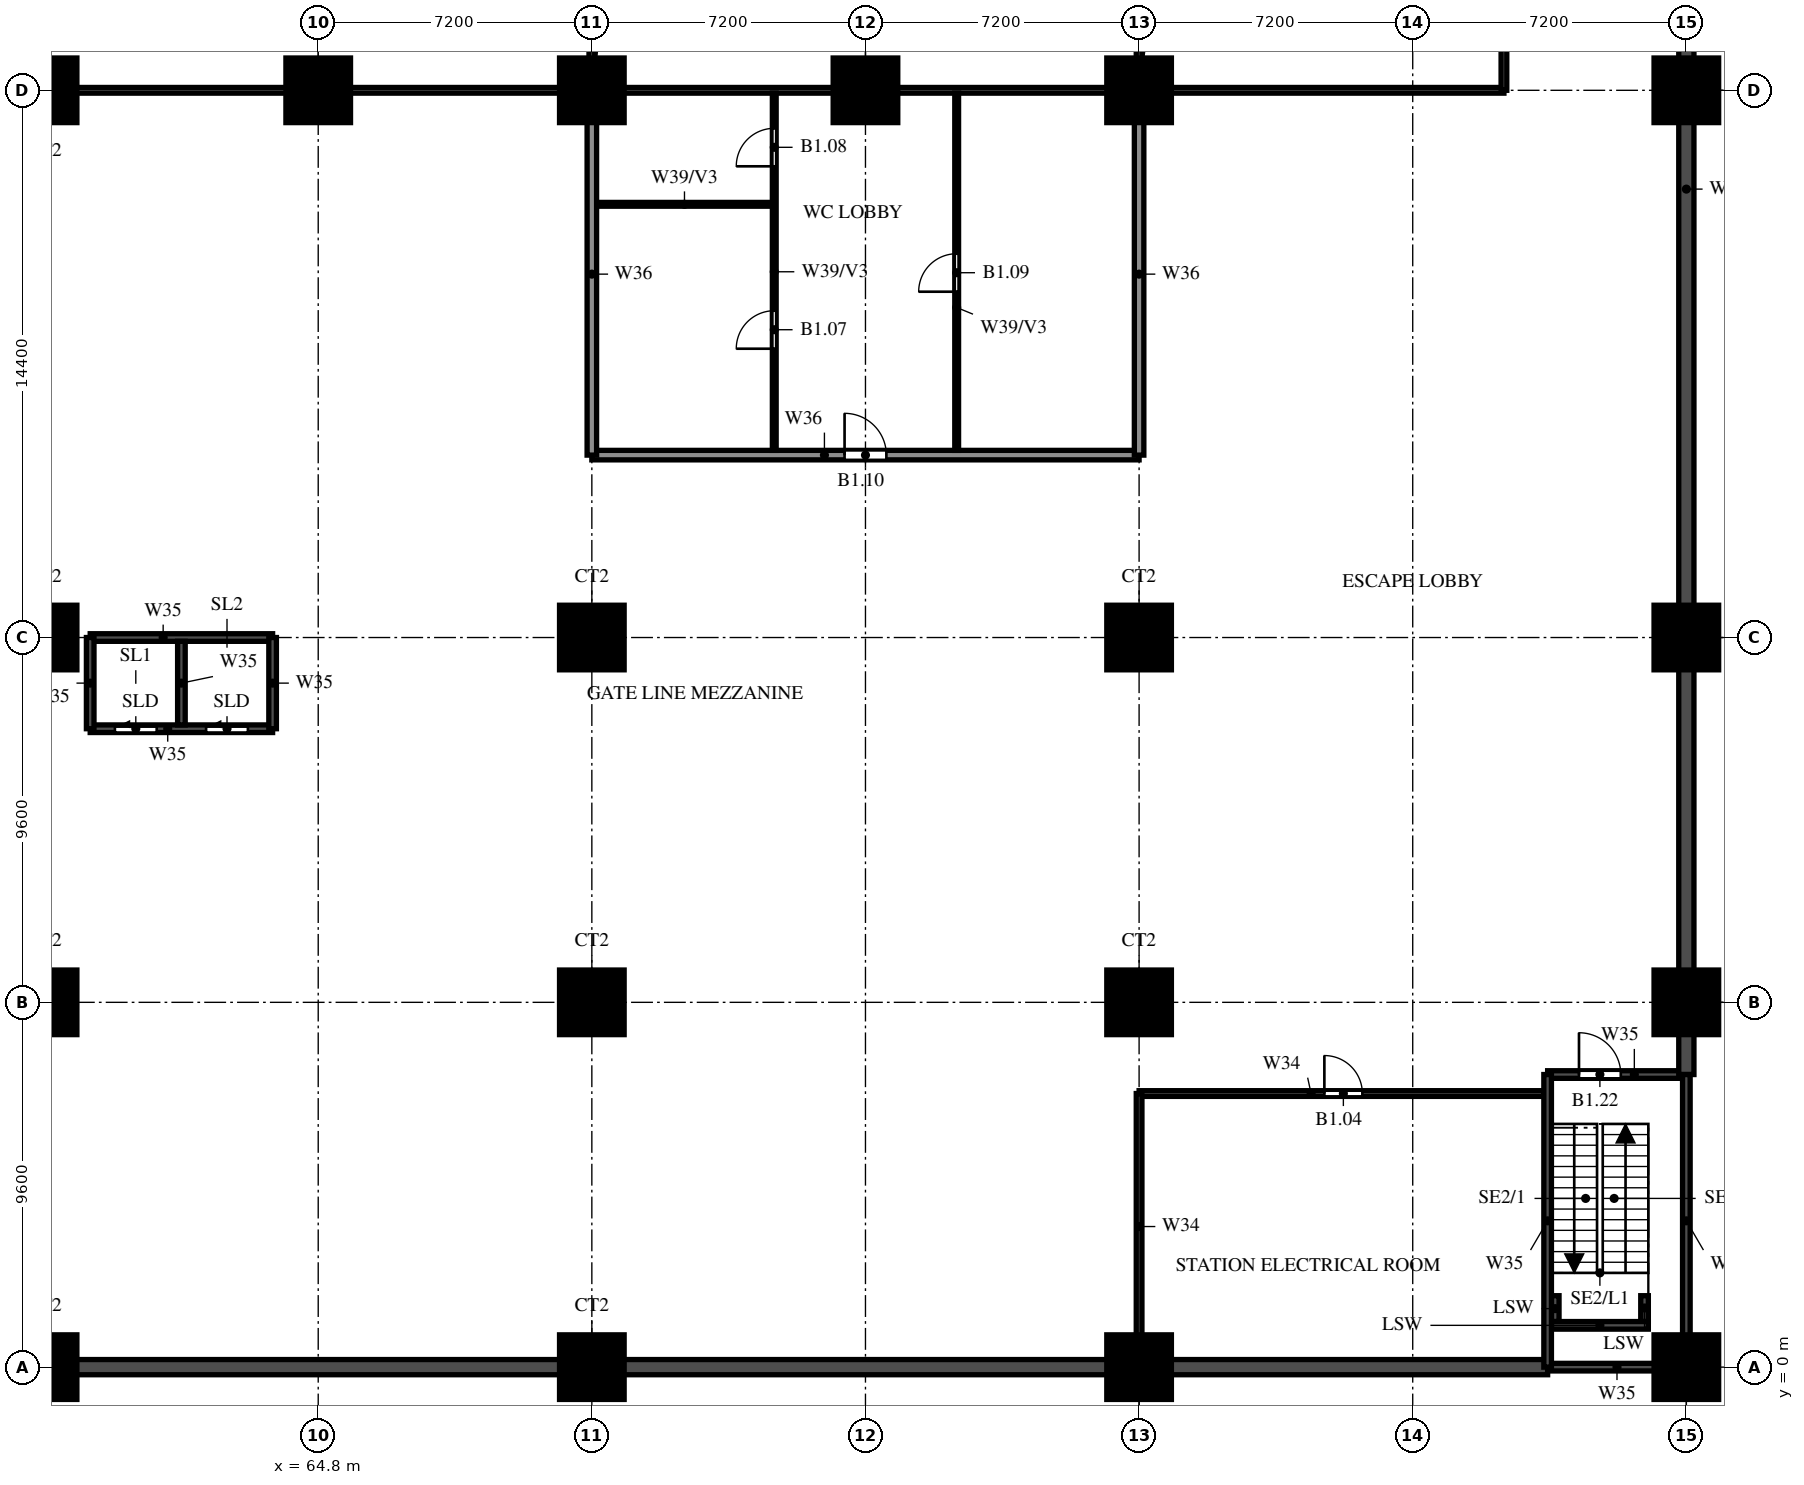
"""IFC4 building model, lengths in metres.
Left out: names, types, materials, properties, quantities, classifications, styles, units other than length and angle.
Written with IfcOpenShell. Run it as: python <this file> out.ifc"""

import sys

from ifc_helpers import new_model, si_unit, direction, frame, frame_2d, origin, origin_2d, place, context, subcontext, project, spatial, rectangle, extrude, source, transform, mapped, element, fill, save


model = new_model("IFC4")
c1 = context("Model", 3, precision=1e-05, world=origin(), true_north=direction((0.0, 1.0)))
c2 = subcontext(c1, "Body", "Model", "MODEL_VIEW")
j1 = project(units=[si_unit("LENGTHUNIT", "METRE"), si_unit("PLANEANGLEUNIT", "RADIAN")], contexts=[c1])
p1 = place(None, origin())
s1 = spatial("IfcSite", under=j1, at=p1, CompositionType="ELEMENT")
p2 = place(p1, origin())
s2 = spatial("IfcBuilding", under=s1, at=p2, CompositionType="ELEMENT")
p3 = place(p2, frame((0.0, 0.0, -5.4)))
s3 = spatial("IfcBuildingStorey", under=s2, at=p3, CompositionType="ELEMENT", Elevation=-5.4)
m1 = source(origin(), c2, "Body", "SweptSolid", [
    extrude(rectangle(XDim=1.7, YDim=1.7, at=origin_2d()), origin(), (0.0, 0.0, 1.0), 5.0),
])
for number, where, z_axis, x_axis in (
    (1, (57.6, 0.0, 0.0), (0.0, 0.0, 1.0), (1.0, 0.0, 0.0)),
    (2, (72.0, 0.0, 0.0), (0.0, 0.0, 1.0), (1.0, 0.0, 0.0)),
    (3, (86.4, 0.0, 0.0), (0.0, 0.0, 1.0), (1.0, 0.0, 0.0)),
    (4, (100.8, 0.0, 0.0), (0.0, 0.0, 1.0), (1.0, 0.0, 0.0)),
    (5, (57.6, 9.6, 0.0), (0.0, 0.0, 1.0), (1.0, 0.0, 0.0)),
    (6, (72.0, 9.6, 0.0), (0.0, 0.0, 1.0), (1.0, 0.0, 0.0)),
    (7, (86.4, 9.6, 0.0), (0.0, 0.0, 1.0), (1.0, 0.0, 0.0)),
    (8, (100.8, 9.6, 0.0), (0.0, 0.0, 1.0), (1.0, 0.0, 0.0)),
    (9, (57.6, 19.2, 0.0), (0.0, 0.0, 1.0), (1.0, 0.0, 0.0)),
    (10, (72.0, 19.2, 0.0), (0.0, 0.0, 1.0), (1.0, 0.0, 0.0)),
    (11, (86.4, 19.2, 0.0), (0.0, 0.0, 1.0), (1.0, 0.0, 0.0)),
    (12, (100.8, 19.2, 0.0), (0.0, 0.0, 1.0), (1.0, 0.0, 0.0)),
    (13, (57.6, 33.6, 0.0), (0.0, 0.0, 1.0), (1.0, 0.0, 0.0)),
    (14, (64.8, 33.6, 0.0), (0.0, 0.0, 1.0), (1.0, 0.0, 0.0)),
    (15, (72.0, 33.6, 0.0), (0.0, 0.0, 1.0), (1.0, 0.0, 0.0)),
    (16, (79.2, 33.6, 0.0), (0.0, 0.0, 1.0), (1.0, 0.0, 0.0)),
    (17, (86.4, 33.6, 0.0), (0.0, 0.0, 1.0), (1.0, 0.0, 0.0)),
    (18, (100.8, 33.6, 0.0), (0.0, 0.0, 1.0), (1.0, 0.0, 0.0)),
):
    element("IfcColumn", number, at=place(p3, frame(where, z_axis=z_axis, x_axis=x_axis)), inside=s3, PredefinedType="COLUMN", context=c2, shape_type="MappedRepresentation", body=[
        mapped(m1, transform((0.0, 0.0, 0.0))),
    ])
for number, where, z_axis, x_axis in (
    (19, (97.35, 1.2, 0.0), (0.0, 0.0, 1.0), (0.0, 1.0, 0.0)),
    (20, (99.7, 1.2, 0.0), (0.0, 0.0, 1.0), (0.0, 1.0, 0.0)),
):
    element("IfcWall", number, at=place(p3, frame(where, z_axis=z_axis, x_axis=x_axis)), inside=s3, PredefinedType="SOLIDWALL", context=c2, shape_type="SweptSolid", body=[
        extrude(rectangle(XDim=0.68, YDim=0.2, at=frame_2d((0.34, 0.0))), origin(), (0.0, 0.0, 1.0), 2.5),
    ])
p4 = place(p3, frame((97.25, 1.1, 0.0), z_axis=(0.0, 0.0, 1.0), x_axis=(1.0, 0.0, 0.0)))
e21 = element("IfcWall", 21, at=p4, inside=s3, PredefinedType="SOLIDWALL", context=c2, shape_type="SweptSolid", body=[
    extrude(rectangle(XDim=2.55, YDim=0.2, at=frame_2d((1.275, 0.0))), origin(), (0.0, 0.0, 1.0), 2.5),
])
p5 = place(p3, frame((3.65, 0.0, 0.0), z_axis=(0.0, 0.0, 1.0), x_axis=(1.0, 0.0, 0.0)))
e22 = element("IfcWall", 22, at=p5, inside=s3, PredefinedType="SOLIDWALL", context=c2, shape_type="SweptSolid", body=[
    extrude(rectangle(XDim=93.5, YDim=0.4, at=frame_2d((46.75, 0.0))), origin(), (0.0, 0.0, 1.0), 5.0),
])
p6 = place(p3, frame((97.15, 0.0, 0.0), z_axis=(0.0, 0.0, 1.0), x_axis=(1.0, 0.0, 0.0)))
e23 = element("IfcWall", 23, at=p6, inside=s3, PredefinedType="SOLIDWALL", context=c2, shape_type="SweptSolid", body=[
    extrude(rectangle(XDim=3.65, YDim=0.2, at=frame_2d((1.825, 0.0))), origin(), (0.0, 0.0, 1.0), 5.0),
])
p7 = place(p3, frame((86.4, 7.2, 0.0), z_axis=(0.0, 0.0, 1.0), x_axis=(1.0, 0.0, 0.0)))
e24 = element("IfcWall", 24, at=p7, inside=s3, PredefinedType="PARTITIONING", context=c2, shape_type="SweptSolid", body=[
    extrude(rectangle(XDim=10.65, YDim=0.15, at=frame_2d((5.325, 0.0))), origin(), (0.0, 0.0, 1.0), 3.8),
])
p8 = place(p7, frame((4.875, 0.0, 0.0)))
e25 = element("IfcOpeningElement", 25, at=p8, cuts=e24, PredefinedType="OPENING", context=c2, shape_type="SweptSolid", body=[
    extrude(rectangle(XDim=1.0, YDim=2.1, at=frame_2d((0.5, 1.05))), frame((0.0, 0.085, 0.0), z_axis=(0.0, -1.0, 0.0), x_axis=(1.0, 0.0, 0.0)), (0.0, 0.0, 1.0), 0.17),
])
p9 = place(p3, frame((97.15, 7.7, 0.0), z_axis=(0.0, 0.0, 1.0), x_axis=(1.0, 0.0, 0.0)))
e26 = element("IfcWall", 26, at=p9, inside=s3, PredefinedType="SOLIDWALL", context=c2, shape_type="SweptSolid", body=[
    extrude(rectangle(XDim=3.65, YDim=0.2, at=frame_2d((1.825, 0.0))), origin(), (0.0, 0.0, 1.0), 5.0),
])
p10 = place(p9, frame((0.825, 0.0, 0.0)))
e27 = element("IfcOpeningElement", 27, at=p10, cuts=e26, PredefinedType="OPENING", context=c2, shape_type="SweptSolid", body=[
    extrude(rectangle(XDim=1.1, YDim=2.1, at=frame_2d((0.55, 1.05))), frame((0.0, 0.11, 0.0), z_axis=(0.0, -1.0, 0.0), x_axis=(1.0, 0.0, 0.0)), (0.0, 0.0, 1.0), 0.22),
])
p11 = place(p3, frame((58.8, 16.8, 0.0), z_axis=(0.0, 0.0, 1.0), x_axis=(1.0, 0.0, 0.0)))
e28 = element("IfcWall", 28, at=p11, inside=s3, PredefinedType="SOLIDWALL", context=c2, shape_type="SweptSolid", body=[
    extrude(rectangle(XDim=4.8, YDim=0.2, at=frame_2d((2.4, 0.0))), origin(), (0.0, 0.0, 1.0), 5.0),
])
p12 = place(p11, frame((0.65, 0.0, 0.0)))
e29 = element("IfcOpeningElement", 29, at=p12, cuts=e28, PredefinedType="OPENING", context=c2, shape_type="SweptSolid", body=[
    extrude(rectangle(XDim=1.1, YDim=2.1, at=frame_2d((0.55, 1.05))), frame((0.0, 0.11, 0.0), z_axis=(0.0, -1.0, 0.0), x_axis=(1.0, 0.0, 0.0)), (0.0, 0.0, 1.0), 0.22),
])
p13 = place(p11, frame((3.05, 0.0, 0.0)))
e30 = element("IfcOpeningElement", 30, at=p13, cuts=e28, PredefinedType="OPENING", context=c2, shape_type="SweptSolid", body=[
    extrude(rectangle(XDim=1.1, YDim=2.1, at=frame_2d((0.55, 1.05))), frame((0.0, 0.11, 0.0), z_axis=(0.0, -1.0, 0.0), x_axis=(1.0, 0.0, 0.0)), (0.0, 0.0, 1.0), 0.22),
])
p14 = place(p3, frame((58.8, 19.2, 0.0), z_axis=(0.0, 0.0, 1.0), x_axis=(1.0, 0.0, 0.0)))
e31 = element("IfcWall", 31, at=p14, inside=s3, PredefinedType="SOLIDWALL", context=c2, shape_type="SweptSolid", body=[
    extrude(rectangle(XDim=4.8, YDim=0.2, at=frame_2d((2.4, 0.0))), origin(), (0.0, 0.0, 1.0), 5.0),
])
p15 = place(p3, frame((72.0, 24.0, 0.0), z_axis=(0.0, 0.0, 1.0), x_axis=(1.0, 0.0, 0.0)))
e32 = element("IfcWall", 32, at=p15, inside=s3, PredefinedType="SOLIDWALL", context=c2, shape_type="SweptSolid", body=[
    extrude(rectangle(XDim=14.4, YDim=0.25, at=frame_2d((7.2, 0.0))), origin(), (0.0, 0.0, 1.0), 3.8),
])
p16 = place(p15, frame((6.65, 0.0, 0.0)))
e33 = element("IfcOpeningElement", 33, at=p16, cuts=e32, PredefinedType="OPENING", context=c2, shape_type="SweptSolid", body=[
    extrude(rectangle(XDim=1.1, YDim=2.1, at=frame_2d((0.55, 1.05))), frame((0.0, 0.135, 0.0), z_axis=(0.0, -1.0, 0.0), x_axis=(1.0, 0.0, 0.0)), (0.0, 0.0, 1.0), 0.27),
])
p17 = place(p3, frame((72.125, 30.6, 0.0), z_axis=(0.0, 0.0, 1.0), x_axis=(1.0, 0.0, 0.0)))
e34 = element("IfcWall", 34, at=p17, inside=s3, PredefinedType="PARTITIONING", context=c2, shape_type="SweptSolid", body=[
    extrude(rectangle(XDim=4.625, YDim=0.1, at=frame_2d((2.312, 0.0))), origin(), (0.0, 0.0, 1.0), 5.0),
])
p18 = place(p3, frame((4.8, 33.6, 0.0), z_axis=(0.0, 0.0, 1.0), x_axis=(1.0, 0.0, 0.0)))
e35 = element("IfcWall", 35, at=p18, inside=s3, PredefinedType="PARTITIONING", context=c2, shape_type="SweptSolid", body=[
    extrude(rectangle(XDim=91.2, YDim=0.15, at=frame_2d((45.6, 0.0))), origin(), (0.0, 0.0, 1.0), 3.8),
])
p19 = place(p3, frame((58.8, 16.8, 0.0), z_axis=(0.0, 0.0, 1.0), x_axis=(0.0, 1.0, 0.0)))
e36 = element("IfcWall", 36, at=p19, inside=s3, PredefinedType="SOLIDWALL", context=c2, shape_type="SweptSolid", body=[
    extrude(rectangle(XDim=2.4, YDim=0.2, at=frame_2d((1.2, 0.0))), origin(), (0.0, 0.0, 1.0), 5.0),
])
p20 = place(p3, frame((61.2, 16.9, 0.0), z_axis=(0.0, 0.0, 1.0), x_axis=(0.0, 1.0, 0.0)))
e37 = element("IfcWall", 37, at=p20, inside=s3, PredefinedType="SOLIDWALL", context=c2, shape_type="SweptSolid", body=[
    extrude(rectangle(XDim=2.2, YDim=0.2, at=frame_2d((1.1, 0.0))), origin(), (0.0, 0.0, 1.0), 5.0),
])
p21 = place(p3, frame((63.6, 16.8, 0.0), z_axis=(0.0, 0.0, 1.0), x_axis=(0.0, 1.0, 0.0)))
e38 = element("IfcWall", 38, at=p21, inside=s3, PredefinedType="SOLIDWALL", context=c2, shape_type="SweptSolid", body=[
    extrude(rectangle(XDim=2.4, YDim=0.2, at=frame_2d((1.2, 0.0))), origin(), (0.0, 0.0, 1.0), 5.0),
])
p22 = place(p3, frame((72.0, 33.675, 0.0), z_axis=(0.0, 0.0, 1.0), x_axis=(0.0, 1.0, 0.0)))
e39 = element("IfcWall", 39, at=p22, inside=s3, PredefinedType="PARTITIONING", context=c2, shape_type="SweptSolid", body=[
    extrude(rectangle(XDim=15.75, YDim=0.15, at=frame_2d((7.875, 0.0))), origin(), (0.0, 0.0, 1.0), 3.8),
])
p23 = place(p3, frame((72.0, 24.0, 0.0), z_axis=(0.0, 0.0, 1.0), x_axis=(0.0, 1.0, 0.0)))
e40 = element("IfcWall", 40, at=p23, inside=s3, PredefinedType="SOLIDWALL", context=c2, shape_type="SweptSolid", body=[
    extrude(rectangle(XDim=9.525, YDim=0.25, at=frame_2d((4.762, 0.0))), origin(), (0.0, 0.0, 1.0), 3.8),
])
p24 = place(p3, frame((76.8, 24.125, 0.0), z_axis=(0.0, 0.0, 1.0), x_axis=(0.0, 1.0, 0.0)))
e41 = element("IfcWall", 41, at=p24, inside=s3, PredefinedType="PARTITIONING", context=c2, shape_type="SweptSolid", body=[
    extrude(rectangle(XDim=9.4, YDim=0.1, at=frame_2d((4.7, 0.0))), origin(), (0.0, 0.0, 1.0), 5.0),
])
p25 = place(p24, frame((2.675, 0.0, 0.0)))
e42 = element("IfcOpeningElement", 42, at=p25, cuts=e41, PredefinedType="OPENING", context=c2, shape_type="SweptSolid", body=[
    extrude(rectangle(XDim=1.0, YDim=2.1, at=frame_2d((0.5, 1.05))), frame((0.0, 0.06, 0.0), z_axis=(0.0, -1.0, 0.0), x_axis=(1.0, 0.0, 0.0)), (0.0, 0.0, 1.0), 0.12),
])
p26 = place(p24, frame((7.475, 0.0, 0.0)))
e43 = element("IfcOpeningElement", 43, at=p26, cuts=e41, PredefinedType="OPENING", context=c2, shape_type="SweptSolid", body=[
    extrude(rectangle(XDim=1.0, YDim=2.1, at=frame_2d((0.5, 1.05))), frame((0.0, 0.06, 0.0), z_axis=(0.0, -1.0, 0.0), x_axis=(1.0, 0.0, 0.0)), (0.0, 0.0, 1.0), 0.12),
])
p27 = place(p3, frame((81.6, 24.125, 0.0), z_axis=(0.0, 0.0, 1.0), x_axis=(0.0, 1.0, 0.0)))
e44 = element("IfcWall", 44, at=p27, inside=s3, PredefinedType="PARTITIONING", context=c2, shape_type="SweptSolid", body=[
    extrude(rectangle(XDim=9.4, YDim=0.1, at=frame_2d((4.7, 0.0))), origin(), (0.0, 0.0, 1.0), 5.0),
])
p28 = place(p27, frame((4.175, 0.0, 0.0)))
e45 = element("IfcOpeningElement", 45, at=p28, cuts=e44, PredefinedType="OPENING", context=c2, shape_type="SweptSolid", body=[
    extrude(rectangle(XDim=1.0, YDim=2.1, at=frame_2d((0.5, 1.05))), frame((0.0, 0.06, 0.0), z_axis=(0.0, -1.0, 0.0), x_axis=(1.0, 0.0, 0.0)), (0.0, 0.0, 1.0), 0.12),
])
p29 = place(p3, frame((86.4, 0.2, 0.0), z_axis=(0.0, 0.0, 1.0), x_axis=(0.0, 1.0, 0.0)))
e46 = element("IfcWall", 46, at=p29, inside=s3, PredefinedType="PARTITIONING", context=c2, shape_type="SweptSolid", body=[
    extrude(rectangle(XDim=7.0, YDim=0.15, at=frame_2d((3.5, 0.0))), origin(), (0.0, 0.0, 1.0), 3.8),
])
p30 = place(p3, frame((86.4, 33.675, 0.0), z_axis=(0.0, 0.0, 1.0), x_axis=(0.0, 1.0, 0.0)))
e47 = element("IfcWall", 47, at=p30, inside=s3, PredefinedType="PARTITIONING", context=c2, shape_type="SweptSolid", body=[
    extrude(rectangle(XDim=15.75, YDim=0.15, at=frame_2d((7.875, 0.0))), origin(), (0.0, 0.0, 1.0), 3.8),
])
p31 = place(p3, frame((86.4, 24.0, 0.0), z_axis=(0.0, 0.0, 1.0), x_axis=(0.0, 1.0, 0.0)))
e48 = element("IfcWall", 48, at=p31, inside=s3, PredefinedType="SOLIDWALL", context=c2, shape_type="SweptSolid", body=[
    extrude(rectangle(XDim=9.525, YDim=0.25, at=frame_2d((4.762, 0.0))), origin(), (0.0, 0.0, 1.0), 3.8),
])
p32 = place(p3, frame((96.0, 33.6, 0.0), z_axis=(0.0, 0.0, 1.0), x_axis=(0.0, 1.0, 0.0)))
e49 = element("IfcWall", 49, at=p32, inside=s3, PredefinedType="PARTITIONING", context=c2, shape_type="SweptSolid", body=[
    extrude(rectangle(XDim=15.9, YDim=0.15, at=frame_2d((7.95, 0.0))), origin(), (0.0, 0.0, 1.0), 3.8),
])
p33 = place(p3, frame((97.15, 0.0, 0.0), z_axis=(0.0, 0.0, 1.0), x_axis=(0.0, 1.0, 0.0)))
e50 = element("IfcWall", 50, at=p33, inside=s3, PredefinedType="SOLIDWALL", context=c2, shape_type="SweptSolid", body=[
    extrude(rectangle(XDim=7.7, YDim=0.2, at=frame_2d((3.85, 0.0))), origin(), (0.0, 0.0, 1.0), 5.0),
])
p34 = place(p3, frame((100.8, 7.7, 0.0), z_axis=(0.0, 0.0, 1.0), x_axis=(0.0, 1.0, 0.0)))
e51 = element("IfcWall", 51, at=p34, inside=s3, PredefinedType="SOLIDWALL", context=c2, shape_type="SweptSolid", body=[
    extrude(rectangle(XDim=46.6, YDim=0.4, at=frame_2d((23.3, 0.0))), origin(), (0.0, 0.0, 1.0), 5.0),
])
p35 = place(p3, frame((100.8, 0.0, 0.0), z_axis=(0.0, 0.0, 1.0), x_axis=(0.0, 1.0, 0.0)))
e52 = element("IfcWall", 52, at=p35, inside=s3, PredefinedType="SOLIDWALL", context=c2, shape_type="SweptSolid", body=[
    extrude(rectangle(XDim=7.7, YDim=0.2, at=frame_2d((3.85, 0.0))), origin(), (0.0, 0.0, 1.0), 5.0),
])
p36 = place(p12, origin())
e53 = element("IfcDoor", 53, at=p36, inside=s3, OperationType="SLIDING_TO_LEFT", PredefinedType="DOOR", context=c2, shape_type="SweptSolid", body=[
    extrude(rectangle(XDim=1.1, YDim=2.1, at=frame_2d((0.55, 1.05))), frame((0.0, 0.025, 0.0), z_axis=(0.0, -1.0, 0.0), x_axis=(1.0, 0.0, 0.0)), (0.0, 0.0, 1.0), 0.05),
])
fill(e29, e53)
p37 = place(p13, origin())
e54 = element("IfcDoor", 54, at=p37, inside=s3, OperationType="SLIDING_TO_LEFT", PredefinedType="DOOR", context=c2, shape_type="SweptSolid", body=[
    extrude(rectangle(XDim=1.1, YDim=2.1, at=frame_2d((0.55, 1.05))), frame((0.0, 0.025, 0.0), z_axis=(0.0, -1.0, 0.0), x_axis=(1.0, 0.0, 0.0)), (0.0, 0.0, 1.0), 0.05),
])
fill(e30, e54)
p38 = place(p8, origin())
e55 = element("IfcDoor", 55, at=p38, inside=s3, OperationType="SINGLE_SWING_RIGHT", PredefinedType="DOOR", context=c2, shape_type="SweptSolid", body=[
    extrude(rectangle(XDim=1.0, YDim=2.1, at=frame_2d((0.5, 1.05))), frame((0.0, 0.025, 0.0), z_axis=(0.0, -1.0, 0.0), x_axis=(1.0, 0.0, 0.0)), (0.0, 0.0, 1.0), 0.05),
])
fill(e25, e55)
p39 = place(p25, origin())
e56 = element("IfcDoor", 56, at=p39, inside=s3, OperationType="SINGLE_SWING_LEFT", PredefinedType="DOOR", context=c2, shape_type="SweptSolid", body=[
    extrude(rectangle(XDim=1.0, YDim=2.1, at=frame_2d((0.5, 1.05))), frame((0.0, 0.025, 0.0), z_axis=(0.0, -1.0, 0.0), x_axis=(1.0, 0.0, 0.0)), (0.0, 0.0, 1.0), 0.05),
])
fill(e42, e56)
p40 = place(p26, origin())
e57 = element("IfcDoor", 57, at=p40, inside=s3, OperationType="SINGLE_SWING_RIGHT", PredefinedType="DOOR", context=c2, shape_type="SweptSolid", body=[
    extrude(rectangle(XDim=1.0, YDim=2.1, at=frame_2d((0.5, 1.05))), frame((0.0, 0.025, 0.0), z_axis=(0.0, -1.0, 0.0), x_axis=(1.0, 0.0, 0.0)), (0.0, 0.0, 1.0), 0.05),
])
fill(e43, e57)
p41 = place(p28, origin())
e58 = element("IfcDoor", 58, at=p41, inside=s3, OperationType="SINGLE_SWING_LEFT", PredefinedType="DOOR", context=c2, shape_type="SweptSolid", body=[
    extrude(rectangle(XDim=1.0, YDim=2.1, at=frame_2d((0.5, 1.05))), frame((0.0, 0.025, 0.0), z_axis=(0.0, -1.0, 0.0), x_axis=(1.0, 0.0, 0.0)), (0.0, 0.0, 1.0), 0.05),
])
fill(e45, e58)
p42 = place(p16, origin())
e59 = element("IfcDoor", 59, at=p42, inside=s3, OperationType="SINGLE_SWING_RIGHT", PredefinedType="DOOR", context=c2, shape_type="SweptSolid", body=[
    extrude(rectangle(XDim=1.1, YDim=2.1, at=frame_2d((0.55, 1.05))), frame((0.0, 0.025, 0.0), z_axis=(0.0, -1.0, 0.0), x_axis=(1.0, 0.0, 0.0)), (0.0, 0.0, 1.0), 0.05),
])
fill(e33, e59)
p43 = place(p10, origin())
e60 = element("IfcDoor", 60, at=p43, inside=s3, OperationType="SINGLE_SWING_LEFT", PredefinedType="DOOR", context=c2, shape_type="SweptSolid", body=[
    extrude(rectangle(XDim=1.1, YDim=2.1, at=frame_2d((0.55, 1.05))), frame((0.0, 0.025, 0.0), z_axis=(0.0, -1.0, 0.0), x_axis=(1.0, 0.0, 0.0)), (0.0, 0.0, 1.0), 0.05),
])
fill(e27, e60)
save(model, sys.argv[1])
